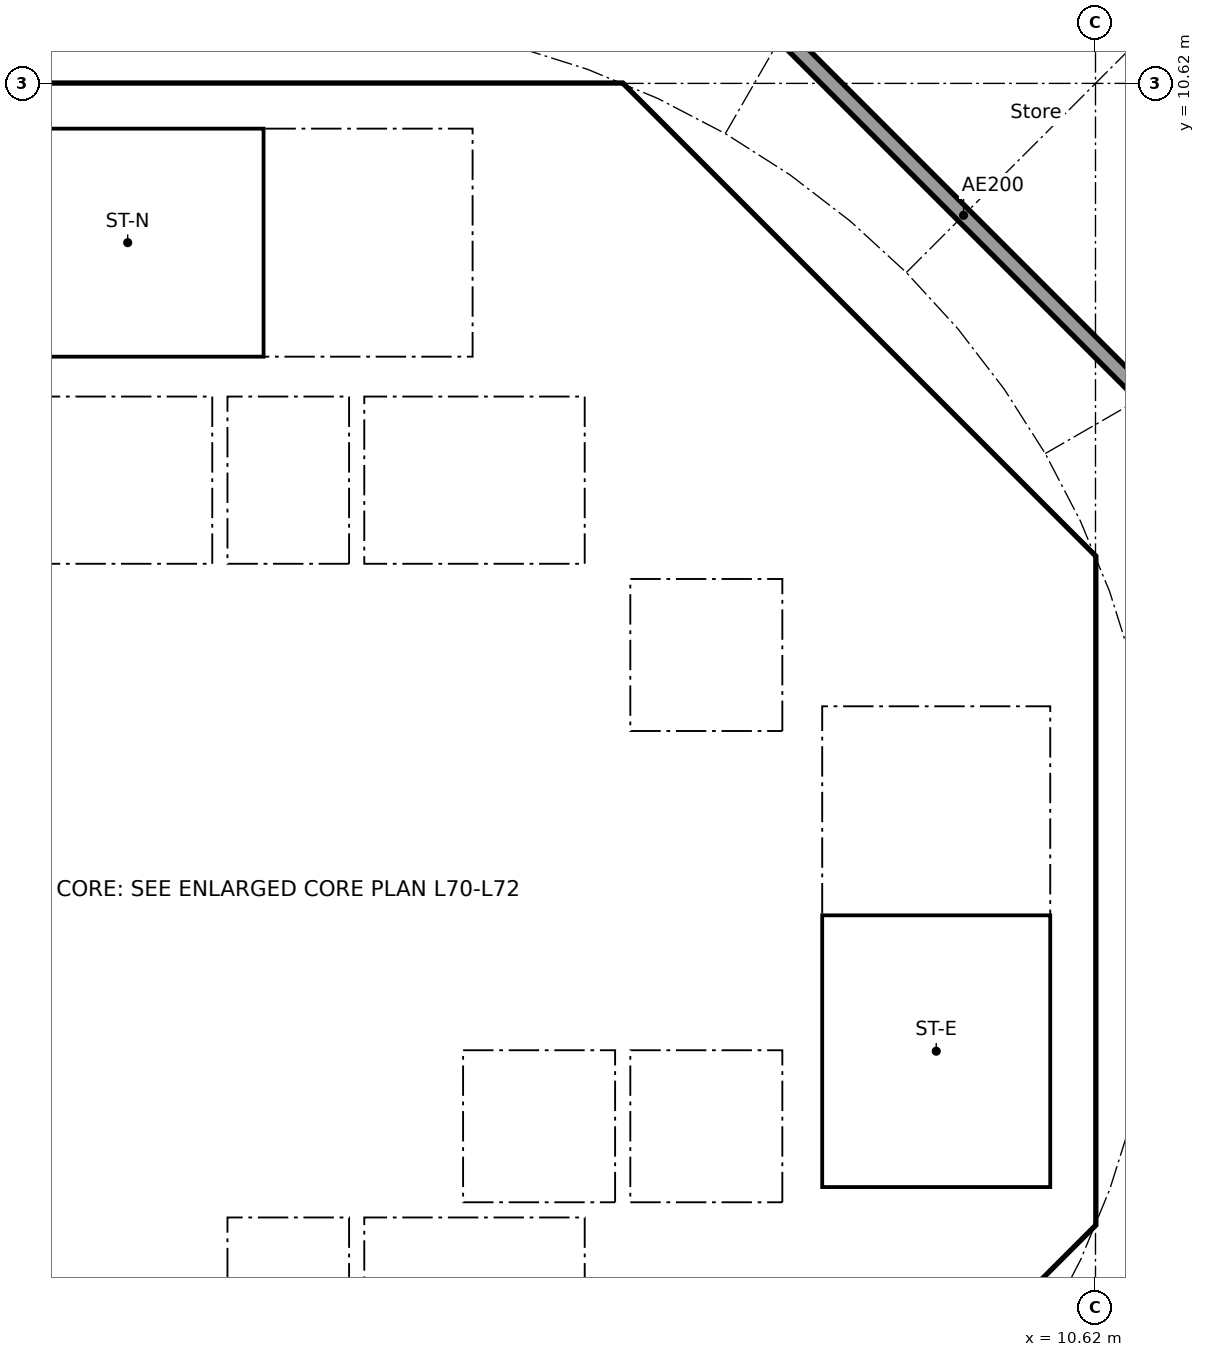
"""IFC4 building model, lengths in metres.
Left out: names, types, materials, properties, quantities, classifications, styles, units other than length and angle.
Written with IfcOpenShell. Run it as: python <this file> out.ifc"""

import sys

from ifc_helpers import new_model, si_unit, direction, frame, frame_2d, origin, place, context, subcontext, project, spatial, polyline, rectangle, outline, extrude, element, fill, save


model = new_model("IFC4")
c1 = context("Model", 3, precision=1e-05, world=origin(), true_north=direction((0.0, 1.0)))
c2 = subcontext(c1, "Body", "Model", "MODEL_VIEW")
j1 = project(units=[si_unit("LENGTHUNIT", "METRE"), si_unit("PLANEANGLEUNIT", "RADIAN")], contexts=[c1])
p1 = place(None, origin())
s1 = spatial("IfcSite", under=j1, at=p1, CompositionType="ELEMENT")
p2 = place(p1, origin())
s2 = spatial("IfcBuilding", under=s1, at=p2, CompositionType="ELEMENT")
p3 = place(p2, frame((0.0, 0.0, 277.0)))
s3 = spatial("IfcBuildingStorey", under=s2, at=p3, CompositionType="ELEMENT", Elevation=277.0)
p4 = place(p3, frame((9.988, 4.613, 0.0), z_axis=(0.0, 0.0, 1.0), x_axis=(-0.707106781187, 0.707106781187, 0.0)))
e1 = element("IfcWall", 1, at=p4, inside=s3, PredefinedType="SHEAR", context=c2, shape_type="SweptSolid", body=[
    extrude(rectangle(XDim=7.602, YDim=0.6, at=frame_2d((3.801, 0.0))), origin(), (0.0, 0.0, 1.0), 3.44),
])
p5 = place(p4, frame((3.201, 0.0, 0.0)))
e2 = element("IfcOpeningElement", 2, at=p5, cuts=e1, PredefinedType="OPENING", context=c2, shape_type="SweptSolid", body=[
    extrude(rectangle(XDim=1.2, YDim=2.1, at=frame_2d((0.6, 1.05))), frame((0.0, 0.31, 0.0), z_axis=(0.0, -1.0, 0.0), x_axis=(1.0, 0.0, 0.0)), (0.0, 0.0, 1.0), 0.62),
])
p6 = place(p3, frame((4.613, -9.988, 0.0), z_axis=(0.0, 0.0, 1.0), x_axis=(0.707106781187, 0.707106781187, 0.0)))
e3 = element("IfcWall", 3, at=p6, inside=s3, PredefinedType="SHEAR", context=c2, shape_type="SweptSolid", body=[
    extrude(rectangle(XDim=7.602, YDim=0.6, at=frame_2d((3.801, 0.0))), origin(), (0.0, 0.0, 1.0), 3.44),
])
p7 = place(p6, frame((3.201, 0.0, 0.0)))
e4 = element("IfcOpeningElement", 4, at=p7, cuts=e3, PredefinedType="OPENING", context=c2, shape_type="SweptSolid", body=[
    extrude(rectangle(XDim=1.2, YDim=2.1, at=frame_2d((0.6, 1.05))), frame((0.0, 0.31, 0.0), z_axis=(0.0, -1.0, 0.0), x_axis=(1.0, 0.0, 0.0)), (0.0, 0.0, 1.0), 0.62),
])
p8 = place(p3, frame((4.0, 4.3, 0.0), z_axis=(0.0, 0.0, 1.0), x_axis=(0.0, 1.0, 0.0)))
e5 = element("IfcWall", 5, at=p8, inside=s3, PredefinedType="SOLIDWALL", context=c2, shape_type="SweptSolid", body=[
    extrude(rectangle(XDim=2.2, YDim=0.2, at=frame_2d((1.1, 0.0))), origin(), (0.0, 0.0, 1.0), 3.44),
])
p9 = place(p8, frame((0.55, 0.0, 0.0)))
e6 = element("IfcOpeningElement", 6, at=p9, cuts=e5, PredefinedType="OPENING", context=c2, shape_type="SweptSolid", body=[
    extrude(rectangle(XDim=1.1, YDim=2.1, at=frame_2d((0.55, 1.05))), frame((0.0, 0.11, 0.0), z_axis=(0.0, -1.0, 0.0), x_axis=(1.0, 0.0, 0.0)), (0.0, 0.0, 1.0), 0.22),
])
p10 = place(p3, frame((-6.7, 2.0, 0.0), z_axis=(0.0, 0.0, 1.0), x_axis=(1.0, 0.0, 0.0)))
e7 = element("IfcWall", 7, at=p10, inside=s3, PredefinedType="SOLIDWALL", context=c2, shape_type="SweptSolid", body=[
    extrude(rectangle(XDim=13.4, YDim=0.2, at=frame_2d((6.7, 0.0))), origin(), (0.0, 0.0, 1.0), 3.44),
])
p11 = place(p10, frame((11.65, 0.0, 0.0)))
e8 = element("IfcOpeningElement", 8, at=p11, cuts=e7, PredefinedType="OPENING", context=c2, shape_type="SweptSolid", body=[
    extrude(rectangle(XDim=1.1, YDim=2.1, at=frame_2d((0.55, 1.05))), frame((0.0, 0.11, 0.0), z_axis=(0.0, -1.0, 0.0), x_axis=(1.0, 0.0, 0.0)), (0.0, 0.0, 1.0), 0.22),
])
p12 = place(p10, frame((1.85, 0.0, 0.0)))
e9 = element("IfcOpeningElement", 9, at=p12, cuts=e7, PredefinedType="OPENING", context=c2, shape_type="SweptSolid", body=[
    extrude(rectangle(XDim=0.9, YDim=2.1, at=frame_2d((0.45, 1.05))), frame((0.0, 0.11, 0.0), z_axis=(0.0, -1.0, 0.0), x_axis=(1.0, 0.0, 0.0)), (0.0, 0.0, 1.0), 0.22),
])
p13 = place(p10, frame((5.15, 0.0, 0.0)))
e10 = element("IfcOpeningElement", 10, at=p13, cuts=e7, PredefinedType="OPENING", context=c2, shape_type="SweptSolid", body=[
    extrude(rectangle(XDim=0.9, YDim=2.1, at=frame_2d((0.45, 1.05))), frame((0.0, 0.11, 0.0), z_axis=(0.0, -1.0, 0.0), x_axis=(1.0, 0.0, 0.0)), (0.0, 0.0, 1.0), 0.22),
])
p14 = place(p10, frame((8.45, 0.0, 0.0)))
e11 = element("IfcOpeningElement", 11, at=p14, cuts=e7, PredefinedType="OPENING", context=c2, shape_type="SweptSolid", body=[
    extrude(rectangle(XDim=0.9, YDim=2.1, at=frame_2d((0.45, 1.05))), frame((0.0, 0.11, 0.0), z_axis=(0.0, -1.0, 0.0), x_axis=(1.0, 0.0, 0.0)), (0.0, 0.0, 1.0), 0.22),
])
p15 = place(p3, frame((6.7, 4.0, 0.0), z_axis=(0.0, 0.0, 1.0), x_axis=(1.0, 0.0, 0.0)))
e12 = element("IfcWall", 12, at=p15, inside=s3, PredefinedType="SOLIDWALL", context=c2, shape_type="SweptSolid", body=[
    extrude(rectangle(XDim=3.325, YDim=0.2, at=frame_2d((1.662, 0.0))), origin(), (0.0, 0.0, 1.0), 3.44),
])
p16 = place(p15, frame((1.25, 0.0, 0.0)))
e13 = element("IfcOpeningElement", 13, at=p16, cuts=e12, PredefinedType="OPENING", context=c2, shape_type="SweptSolid", body=[
    extrude(rectangle(XDim=1.1, YDim=2.1, at=frame_2d((0.55, 1.05))), frame((0.0, 0.11, 0.0), z_axis=(0.0, -1.0, 0.0), x_axis=(1.0, 0.0, 0.0)), (0.0, 0.0, 1.0), 0.22),
])
p17 = place(p3, frame((4.0, 7.025, 0.0), z_axis=(0.0, 0.0, 1.0), x_axis=(0.0, 1.0, 0.0)))
e14 = element("IfcWall", 14, at=p17, inside=s3, PredefinedType="SOLIDWALL", context=c2, shape_type="SweptSolid", body=[
    extrude(rectangle(XDim=3.0, YDim=0.2, at=frame_2d((1.5, 0.0))), origin(), (0.0, 0.0, 1.0), 3.44),
])
p18 = place(p17, frame((0.925, 0.0, 0.0)))
e15 = element("IfcOpeningElement", 15, at=p18, cuts=e14, PredefinedType="OPENING", context=c2, shape_type="SweptSolid", body=[
    extrude(rectangle(XDim=1.1, YDim=2.1, at=frame_2d((0.55, 1.05))), frame((0.0, 0.11, 0.0), z_axis=(0.0, -1.0, 0.0), x_axis=(1.0, 0.0, 0.0)), (0.0, 0.0, 1.0), 0.22),
])
p19 = place(p3, frame((4.0, -6.5, 0.0), z_axis=(0.0, 0.0, 1.0), x_axis=(0.0, 1.0, 0.0)))
e16 = element("IfcWall", 16, at=p19, inside=s3, PredefinedType="SOLIDWALL", context=c2, shape_type="SweptSolid", body=[
    extrude(rectangle(XDim=2.2, YDim=0.2, at=frame_2d((1.1, 0.0))), origin(), (0.0, 0.0, 1.0), 3.44),
])
p20 = place(p19, frame((0.55, 0.0, 0.0)))
e17 = element("IfcOpeningElement", 17, at=p20, cuts=e16, PredefinedType="OPENING", context=c2, shape_type="SweptSolid", body=[
    extrude(rectangle(XDim=1.1, YDim=2.1, at=frame_2d((0.55, 1.05))), frame((0.0, 0.11, 0.0), z_axis=(0.0, -1.0, 0.0), x_axis=(1.0, 0.0, 0.0)), (0.0, 0.0, 1.0), 0.22),
])
p21 = place(p3, frame((-6.7, -2.0, 0.0), z_axis=(0.0, 0.0, 1.0), x_axis=(1.0, 0.0, 0.0)))
e18 = element("IfcWall", 18, at=p21, inside=s3, PredefinedType="SOLIDWALL", context=c2, shape_type="SweptSolid", body=[
    extrude(rectangle(XDim=13.4, YDim=0.2, at=frame_2d((6.7, 0.0))), origin(), (0.0, 0.0, 1.0), 3.44),
])
p22 = place(p21, frame((9.45, 0.0, 0.0)))
e19 = element("IfcOpeningElement", 19, at=p22, cuts=e18, PredefinedType="OPENING", context=c2, shape_type="SweptSolid", body=[
    extrude(rectangle(XDim=1.1, YDim=2.1, at=frame_2d((0.55, 1.05))), frame((0.0, 0.11, 0.0), z_axis=(0.0, -1.0, 0.0), x_axis=(1.0, 0.0, 0.0)), (0.0, 0.0, 1.0), 0.22),
])
p23 = place(p21, frame((11.65, 0.0, 0.0)))
e20 = element("IfcOpeningElement", 20, at=p23, cuts=e18, PredefinedType="OPENING", context=c2, shape_type="SweptSolid", body=[
    extrude(rectangle(XDim=1.1, YDim=2.1, at=frame_2d((0.55, 1.05))), frame((0.0, 0.11, 0.0), z_axis=(0.0, -1.0, 0.0), x_axis=(1.0, 0.0, 0.0)), (0.0, 0.0, 1.0), 0.22),
])
p24 = place(p21, frame((1.85, 0.0, 0.0)))
e21 = element("IfcOpeningElement", 21, at=p24, cuts=e18, PredefinedType="OPENING", context=c2, shape_type="SweptSolid", body=[
    extrude(rectangle(XDim=0.9, YDim=2.1, at=frame_2d((0.45, 1.05))), frame((0.0, 0.11, 0.0), z_axis=(0.0, -1.0, 0.0), x_axis=(1.0, 0.0, 0.0)), (0.0, 0.0, 1.0), 0.22),
])
p25 = place(p21, frame((5.15, 0.0, 0.0)))
e22 = element("IfcOpeningElement", 22, at=p25, cuts=e18, PredefinedType="OPENING", context=c2, shape_type="SweptSolid", body=[
    extrude(rectangle(XDim=0.9, YDim=2.1, at=frame_2d((0.45, 1.05))), frame((0.0, 0.11, 0.0), z_axis=(0.0, -1.0, 0.0), x_axis=(1.0, 0.0, 0.0)), (0.0, 0.0, 1.0), 0.22),
])
p26 = place(p21, frame((7.35, 0.0, 0.0)))
e23 = element("IfcOpeningElement", 23, at=p26, cuts=e18, PredefinedType="OPENING", context=c2, shape_type="SweptSolid", body=[
    extrude(rectangle(XDim=0.9, YDim=2.1, at=frame_2d((0.45, 1.05))), frame((0.0, 0.11, 0.0), z_axis=(0.0, -1.0, 0.0), x_axis=(1.0, 0.0, 0.0)), (0.0, 0.0, 1.0), 0.22),
])
p27 = place(p3, origin())
e24 = element("IfcWall", 24, at=p27, inside=s3, PredefinedType="SHEAR", context=c2, shape_type="SweptSolid", body=[
    extrude(outline(polyline([(-4.152, 10.025), (-4.401, 9.776), (-4.825, 10.2), (-4.401, 10.625), (4.401, 10.625), (4.825, 10.2), (4.401, 9.776), (4.152, 10.025), (-4.152, 10.025)])), origin(), (0.0, 0.0, 1.0), 3.44),
])
p28 = place(p3, origin())
e25 = element("IfcWall", 25, at=p28, inside=s3, PredefinedType="SHEAR", context=c2, shape_type="SweptSolid", body=[
    extrude(outline(polyline([(9.776, -4.401), (10.025, -4.152), (10.025, -3.801), (10.025, 4.152), (9.776, 4.401), (10.2, 4.825), (10.625, 4.401), (10.625, -4.401), (10.2, -4.825), (9.776, -4.401)])), origin(), (0.0, 0.0, 1.0), 3.44),
])
for number, where, z_axis, x_axis in (
    (26, (-0.9, 4.3, 0.0), (0.0, 0.0, 1.0), (0.0, 1.0, 0.0)),
    (27, (0.9, 4.3, 0.0), (0.0, 0.0, 1.0), (0.0, 1.0, 0.0)),
):
    element("IfcWall", number, at=place(p3, frame(where, z_axis=z_axis, x_axis=x_axis)), inside=s3, PredefinedType="SOLIDWALL", context=c2, shape_type="SweptSolid", body=[
        extrude(rectangle(XDim=2.2, YDim=0.2, at=frame_2d((1.1, 0.0))), origin(), (0.0, 0.0, 1.0), 3.44),
    ])
p29 = place(p3, origin())
e28 = element("IfcWall", 28, at=p29, inside=s3, PredefinedType="SOLIDWALL", context=c2, shape_type="SweptSolid", body=[
    extrude(outline(polyline([(-6.7, 4.3), (6.7, 4.3), (6.7, 2.1), (6.5, 2.1), (6.5, 4.1), (4.5, 4.1), (4.5, 2.1), (4.3, 2.1), (4.3, 4.1), (0.1, 4.1), (0.1, 2.1), (-0.1, 2.1), (-0.1, 4.1), (-2.1, 4.1), (-2.1, 2.1), (-2.3, 2.1), (-2.3, 4.1), (-6.5, 4.1), (-6.5, 2.1), (-6.7, 2.1), (-6.7, 4.3)])), origin(), (0.0, 0.0, 1.0), 3.44),
])
for number, where, z_axis, x_axis in (
    (29, (-0.9, -6.5, 0.0), (0.0, 0.0, 1.0), (0.0, 1.0, 0.0)),
    (30, (0.9, -6.5, 0.0), (0.0, 0.0, 1.0), (0.0, 1.0, 0.0)),
):
    element("IfcWall", number, at=place(p3, frame(where, z_axis=z_axis, x_axis=x_axis)), inside=s3, PredefinedType="SOLIDWALL", context=c2, shape_type="SweptSolid", body=[
        extrude(rectangle(XDim=2.2, YDim=0.2, at=frame_2d((1.1, 0.0))), origin(), (0.0, 0.0, 1.0), 3.44),
    ])
p30 = place(p3, origin())
e31 = element("IfcWall", 31, at=p30, inside=s3, PredefinedType="SOLIDWALL", context=c2, shape_type="SweptSolid", body=[
    extrude(outline(polyline([(-6.7, -2.1), (-6.5, -2.1), (-6.5, -4.1), (-2.3, -4.1), (-2.3, -2.1), (-2.1, -2.1), (-2.1, -4.1), (-0.1, -4.1), (-0.1, -2.1), (0.1, -2.1), (0.1, -4.1), (2.1, -4.1), (2.1, -2.1), (2.3, -2.1), (2.3, -4.1), (4.3, -4.1), (4.3, -2.1), (4.5, -2.1), (4.5, -4.1), (6.5, -4.1), (6.5, -2.1), (6.7, -2.1), (6.7, -4.3), (-6.7, -4.3), (-6.7, -2.1)])), origin(), (0.0, 0.0, 1.0), 3.44),
])
p31 = place(p3, origin())
e32 = element("IfcWall", 32, at=p31, inside=s3, PredefinedType="SOLIDWALL", context=c2, shape_type="SweptSolid", body=[
    extrude(outline(polyline([(4.1, 6.5), (-4.1, 6.5), (-4.1, 7.025), (4.1, 7.025), (4.1, 6.5)])), origin(), (0.0, 0.0, 1.0), 3.44),
])
p32 = place(p3, origin())
e33 = element("IfcWall", 33, at=p32, inside=s3, PredefinedType="SOLIDWALL", context=c2, shape_type="SweptSolid", body=[
    extrude(outline(polyline([(7.025, -3.9), (6.7, -3.9), (6.7, 3.9), (7.025, 3.9), (7.025, -3.9)])), origin(), (0.0, 0.0, 1.0), 3.44),
])
p33 = place(p3, origin())
e34 = element("IfcWall", 34, at=p33, inside=s3, PredefinedType="SOLIDWALL", context=c2, shape_type="SweptSolid", body=[
    extrude(outline(polyline([(10.025, -4.1), (6.7, -4.1), (6.7, -3.9), (10.025, -3.9), (10.025, -4.1)])), origin(), (0.0, 0.0, 1.0), 3.44),
])
p34 = place(p3, frame((12.635, 5.134, 0.0), z_axis=(0.0, 0.0, 1.0), x_axis=(-0.707106781187, 0.707106781187, 0.0)))
e35 = element("IfcWall", 35, at=p34, inside=s3, PredefinedType="PARTITIONING", context=c2, shape_type="SweptSolid", body=[
    extrude(rectangle(XDim=10.609, YDim=0.2, at=frame_2d((5.305, 0.0))), origin(), (0.0, 0.0, 1.0), 3.44),
])
p35 = place(p3, frame((5.275, -12.494, 0.0), z_axis=(0.0, 0.0, 1.0), x_axis=(0.707106781187, 0.707106781187, 0.0)))
e36 = element("IfcWall", 36, at=p35, inside=s3, PredefinedType="PARTITIONING", context=c2, shape_type="SweptSolid", body=[
    extrude(rectangle(XDim=10.409, YDim=0.2, at=frame_2d((5.205, 0.0))), origin(), (0.0, 0.0, 1.0), 3.44),
])
p36 = place(p3, frame((15.002, 6.543, 0.0), z_axis=(0.0, 0.0, 1.0), x_axis=(-0.637932656528, 0.770092154054, 0.0)))
e37 = element("IfcWall", 37, at=p36, inside=s3, PredefinedType="PARTITIONING", context=c2, shape_type="SweptSolid", body=[
    extrude(rectangle(XDim=6.311, YDim=0.1, at=frame_2d((3.155, 0.0))), origin(), (0.0, 0.0, 1.0), 2.905),
])
p37 = place(p11, origin())
e38 = element("IfcDoor", 38, at=p37, inside=s3, OperationType="DOUBLE_DOOR_SLIDING", PredefinedType="DOOR", context=c2, shape_type="SweptSolid", body=[
    extrude(rectangle(XDim=1.1, YDim=2.1, at=frame_2d((0.55, 1.05))), frame((0.0, 0.025, 0.0), z_axis=(0.0, -1.0, 0.0), x_axis=(1.0, 0.0, 0.0)), (0.0, 0.0, 1.0), 0.05),
])
fill(e8, e38)
p38 = place(p22, origin())
e39 = element("IfcDoor", 39, at=p38, inside=s3, OperationType="DOUBLE_DOOR_SLIDING", PredefinedType="DOOR", context=c2, shape_type="SweptSolid", body=[
    extrude(rectangle(XDim=1.1, YDim=2.1, at=frame_2d((0.55, 1.05))), frame((0.0, 0.025, 0.0), z_axis=(0.0, -1.0, 0.0), x_axis=(1.0, 0.0, 0.0)), (0.0, 0.0, 1.0), 0.05),
])
fill(e19, e39)
p39 = place(p23, origin())
e40 = element("IfcDoor", 40, at=p39, inside=s3, OperationType="DOUBLE_DOOR_SLIDING", PredefinedType="DOOR", context=c2, shape_type="SweptSolid", body=[
    extrude(rectangle(XDim=1.1, YDim=2.1, at=frame_2d((0.55, 1.05))), frame((0.0, 0.025, 0.0), z_axis=(0.0, -1.0, 0.0), x_axis=(1.0, 0.0, 0.0)), (0.0, 0.0, 1.0), 0.05),
])
fill(e20, e40)
p40 = place(p9, origin())
e41 = element("IfcDoor", 41, at=p40, inside=s3, OperationType="DOUBLE_DOOR_SLIDING", PredefinedType="DOOR", context=c2, shape_type="SweptSolid", body=[
    extrude(rectangle(XDim=1.1, YDim=2.1, at=frame_2d((0.55, 1.05))), frame((0.0, 0.025, 0.0), z_axis=(0.0, -1.0, 0.0), x_axis=(1.0, 0.0, 0.0)), (0.0, 0.0, 1.0), 0.05),
])
fill(e6, e41)
p41 = place(p20, origin())
e42 = element("IfcDoor", 42, at=p41, inside=s3, OperationType="DOUBLE_DOOR_SLIDING", PredefinedType="DOOR", context=c2, shape_type="SweptSolid", body=[
    extrude(rectangle(XDim=1.1, YDim=2.1, at=frame_2d((0.55, 1.05))), frame((0.0, 0.025, 0.0), z_axis=(0.0, -1.0, 0.0), x_axis=(1.0, 0.0, 0.0)), (0.0, 0.0, 1.0), 0.05),
])
fill(e17, e42)
p42 = place(p16, frame((1.1, 0.0, 0.0), x_axis=(-1.0, 0.0, 0.0)))
e43 = element("IfcDoor", 43, at=p42, inside=s3, OperationType="SINGLE_SWING_RIGHT", PredefinedType="DOOR", context=c2, shape_type="SweptSolid", body=[
    extrude(rectangle(XDim=1.1, YDim=2.1, at=frame_2d((0.55, 1.05))), frame((0.0, 0.025, 0.0), z_axis=(0.0, -1.0, 0.0), x_axis=(1.0, 0.0, 0.0)), (0.0, 0.0, 1.0), 0.05),
])
fill(e13, e43)
p43 = place(p18, origin())
e44 = element("IfcDoor", 44, at=p43, inside=s3, OperationType="SINGLE_SWING_LEFT", PredefinedType="DOOR", context=c2, shape_type="SweptSolid", body=[
    extrude(rectangle(XDim=1.1, YDim=2.1, at=frame_2d((0.55, 1.05))), frame((0.0, 0.025, 0.0), z_axis=(0.0, -1.0, 0.0), x_axis=(1.0, 0.0, 0.0)), (0.0, 0.0, 1.0), 0.05),
])
fill(e15, e44)
p44 = place(p13, origin())
e45 = element("IfcDoor", 45, at=p44, inside=s3, OperationType="SINGLE_SWING_LEFT", PredefinedType="DOOR", context=c2, shape_type="SweptSolid", body=[
    extrude(rectangle(XDim=0.9, YDim=2.1, at=frame_2d((0.45, 1.05))), frame((0.0, 0.025, 0.0), z_axis=(0.0, -1.0, 0.0), x_axis=(1.0, 0.0, 0.0)), (0.0, 0.0, 1.0), 0.05),
])
fill(e10, e45)
p45 = place(p14, origin())
e46 = element("IfcDoor", 46, at=p45, inside=s3, OperationType="SINGLE_SWING_LEFT", PredefinedType="DOOR", context=c2, shape_type="SweptSolid", body=[
    extrude(rectangle(XDim=0.9, YDim=2.1, at=frame_2d((0.45, 1.05))), frame((0.0, 0.025, 0.0), z_axis=(0.0, -1.0, 0.0), x_axis=(1.0, 0.0, 0.0)), (0.0, 0.0, 1.0), 0.05),
])
fill(e11, e46)
p46 = place(p25, frame((0.9, 0.0, 0.0), x_axis=(-1.0, 0.0, 0.0)))
e47 = element("IfcDoor", 47, at=p46, inside=s3, OperationType="SINGLE_SWING_RIGHT", PredefinedType="DOOR", context=c2, shape_type="SweptSolid", body=[
    extrude(rectangle(XDim=0.9, YDim=2.1, at=frame_2d((0.45, 1.05))), frame((0.0, 0.025, 0.0), z_axis=(0.0, -1.0, 0.0), x_axis=(1.0, 0.0, 0.0)), (0.0, 0.0, 1.0), 0.05),
])
fill(e22, e47)
p47 = place(p26, frame((0.9, 0.0, 0.0), x_axis=(-1.0, 0.0, 0.0)))
e48 = element("IfcDoor", 48, at=p47, inside=s3, OperationType="SINGLE_SWING_RIGHT", PredefinedType="DOOR", context=c2, shape_type="SweptSolid", body=[
    extrude(rectangle(XDim=0.9, YDim=2.1, at=frame_2d((0.45, 1.05))), frame((0.0, 0.025, 0.0), z_axis=(0.0, -1.0, 0.0), x_axis=(1.0, 0.0, 0.0)), (0.0, 0.0, 1.0), 0.05),
])
fill(e23, e48)
p48 = place(p5, origin())
e49 = element("IfcDoor", 49, at=p48, inside=s3, OperationType="SINGLE_SWING_RIGHT", PredefinedType="DOOR", context=c2, shape_type="SweptSolid", body=[
    extrude(rectangle(XDim=1.2, YDim=2.1, at=frame_2d((0.6, 1.05))), frame((0.0, 0.025, 0.0), z_axis=(0.0, -1.0, 0.0), x_axis=(1.0, 0.0, 0.0)), (0.0, 0.0, 1.0), 0.05),
])
fill(e2, e49)
save(model, sys.argv[1])
